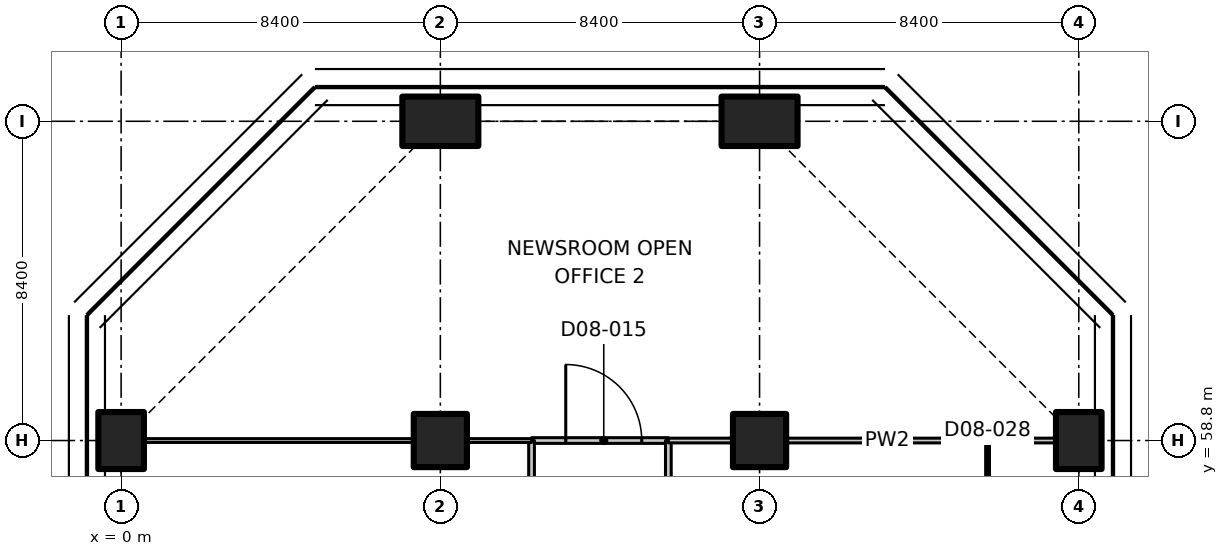
"""IFC4 building model, lengths in metres.
Left out: names, types, materials, properties, quantities, classifications, styles, units other than length and angle.
Written with IfcOpenShell. Run it as: python <this file> out.ifc"""

import sys

from ifc_helpers import new_model, si_unit, direction, frame, frame_2d, origin, origin_2d, place, context, subcontext, project, spatial, rectangle, extrude, element, fill, save


model = new_model("IFC4")
c1 = context("Model", 3, precision=1e-05, world=origin(), true_north=direction((0.0, 1.0)))
c2 = subcontext(c1, "Body", "Model", "MODEL_VIEW")
j1 = project(units=[si_unit("LENGTHUNIT", "METRE"), si_unit("PLANEANGLEUNIT", "RADIAN")], contexts=[c1])
p1 = place(None, origin())
s1 = spatial("IfcSite", under=j1, at=p1, CompositionType="ELEMENT")
p2 = place(p1, origin())
s2 = spatial("IfcBuilding", under=s1, at=p2, CompositionType="ELEMENT")
p3 = place(p2, frame((0.0, 0.0, 47.3)))
s3 = spatial("IfcBuildingStorey", under=s2, at=p3, CompositionType="ELEMENT", Elevation=47.3)
p4 = place(p3, frame((0.0, 58.8, 0.0), z_axis=(0.0, 0.0, 1.0), x_axis=(1.0, 0.0, 0.0)))
e1 = element("IfcColumn", 1, at=p4, inside=s3, PredefinedType="COLUMN", context=c2, shape_type="SweptSolid", body=[
    extrude(rectangle(XDim=1.2, YDim=1.5, at=origin_2d()), origin(), (0.0, 0.0, 1.0), 3.35),
])
p5 = place(p3, frame((8.4, 58.8, 0.0), z_axis=(0.0, 0.0, 1.0), x_axis=(1.0, 0.0, 0.0)))
e2 = element("IfcColumn", 2, at=p5, inside=s3, PredefinedType="COLUMN", context=c2, shape_type="SweptSolid", body=[
    extrude(rectangle(XDim=1.4, YDim=1.4, at=origin_2d()), origin(), (0.0, 0.0, 1.0), 3.35),
])
p6 = place(p3, frame((8.4, 67.2, 0.0), z_axis=(0.0, 0.0, 1.0), x_axis=(0.0, 1.0, 0.0)))
e3 = element("IfcColumn", 3, at=p6, inside=s3, PredefinedType="COLUMN", context=c2, shape_type="SweptSolid", body=[
    extrude(rectangle(XDim=1.3, YDim=2.0, at=origin_2d()), origin(), (0.0, 0.0, 1.0), 3.35),
])
p7 = place(p3, frame((16.8, 58.8, 0.0), z_axis=(0.0, 0.0, 1.0), x_axis=(1.0, 0.0, 0.0)))
e4 = element("IfcColumn", 4, at=p7, inside=s3, PredefinedType="COLUMN", context=c2, shape_type="SweptSolid", body=[
    extrude(rectangle(XDim=1.4, YDim=1.4, at=origin_2d()), origin(), (0.0, 0.0, 1.0), 3.35),
])
p8 = place(p3, frame((16.8, 67.2, 0.0), z_axis=(0.0, 0.0, 1.0), x_axis=(0.0, 1.0, 0.0)))
e5 = element("IfcColumn", 5, at=p8, inside=s3, PredefinedType="COLUMN", context=c2, shape_type="SweptSolid", body=[
    extrude(rectangle(XDim=1.3, YDim=2.0, at=origin_2d()), origin(), (0.0, 0.0, 1.0), 3.35),
])
p9 = place(p3, frame((25.2, 58.8, 0.0), z_axis=(0.0, 0.0, 1.0), x_axis=(1.0, 0.0, 0.0)))
e6 = element("IfcColumn", 6, at=p9, inside=s3, PredefinedType="COLUMN", context=c2, shape_type="SweptSolid", body=[
    extrude(rectangle(XDim=1.2, YDim=1.5, at=origin_2d()), origin(), (0.0, 0.0, 1.0), 3.35),
])
p10 = place(p3, frame((10.8, 58.8, 0.0), z_axis=(0.0, 0.0, 1.0), x_axis=(1.0, 0.0, 0.0)))
e7 = element("IfcWall", 7, at=p10, inside=s3, PredefinedType="PARTITIONING", context=c2, shape_type="SweptSolid", body=[
    extrude(rectangle(XDim=3.6, YDim=0.15, at=frame_2d((1.8, 0.0))), origin(), (0.0, 0.0, 1.0), 3.33),
])
p11 = place(p10, frame((0.9, 0.0, 0.0)))
e8 = element("IfcOpeningElement", 8, at=p11, cuts=e7, PredefinedType="OPENING", context=c2, shape_type="SweptSolid", body=[
    extrude(rectangle(XDim=2.0, YDim=2.4, at=frame_2d((1.0, 1.2))), frame((0.0, 0.085, 0.0), z_axis=(0.0, -1.0, 0.0), x_axis=(1.0, 0.0, 0.0)), (0.0, 0.0, 1.0), 0.17),
])
p12 = place(p3, frame((10.8, 50.4, 0.0), z_axis=(0.0, 0.0, 1.0), x_axis=(0.0, 1.0, 0.0)))
e9 = element("IfcWall", 9, at=p12, inside=s3, PredefinedType="PARTITIONING", context=c2, shape_type="SweptSolid", body=[
    extrude(rectangle(XDim=8.4, YDim=0.15, at=frame_2d((4.2, 0.0))), origin(), (0.0, 0.0, 1.0), 3.33),
])
p13 = place(p12, frame((3.3, 0.0, 0.0)))
e10 = element("IfcOpeningElement", 10, at=p13, cuts=e9, PredefinedType="OPENING", context=c2, shape_type="SweptSolid", body=[
    extrude(rectangle(XDim=1.6, YDim=2.1, at=frame_2d((0.8, 1.05))), frame((0.0, 0.085, 0.0), z_axis=(0.0, -1.0, 0.0), x_axis=(1.0, 0.0, 0.0)), (0.0, 0.0, 1.0), 0.17),
])
p14 = place(p3, frame((14.4, 58.8, 0.0), z_axis=(0.0, 0.0, 1.0), x_axis=(0.0, -1.0, 0.0)))
e11 = element("IfcWall", 11, at=p14, inside=s3, PredefinedType="PARTITIONING", context=c2, shape_type="SweptSolid", body=[
    extrude(rectangle(XDim=4.2, YDim=0.15, at=frame_2d((2.1, 0.0))), origin(), (0.0, 0.0, 1.0), 3.33),
])
p15 = place(p3, frame((10.8, 58.8, 0.0), z_axis=(0.0, 0.0, 1.0), x_axis=(-1.0, 0.0, 0.0)))
e12 = element("IfcWall", 12, at=p15, inside=s3, PredefinedType="PARTITIONING", context=c2, shape_type="SweptSolid", body=[
    extrude(rectangle(XDim=1.68, YDim=0.1, at=frame_2d((0.84, 0.0))), origin(), (0.0, 0.0, 1.0), 3.33),
])
p16 = place(p3, frame((7.68, 58.8, 0.0), z_axis=(0.0, 0.0, 1.0), x_axis=(-1.0, 0.0, 0.0)))
e13 = element("IfcWall", 13, at=p16, inside=s3, PredefinedType="PARTITIONING", context=c2, shape_type="SweptSolid", body=[
    extrude(rectangle(XDim=7.06, YDim=0.1, at=frame_2d((3.53, 0.0))), origin(), (0.0, 0.0, 1.0), 3.33),
])
p17 = place(p3, frame((22.8, 58.8, 0.0), z_axis=(0.0, 0.0, 1.0), x_axis=(-1.0, 0.0, 0.0)))
e14 = element("IfcWall", 14, at=p17, inside=s3, PredefinedType="PARTITIONING", context=c2, shape_type="SweptSolid", body=[
    extrude(rectangle(XDim=5.28, YDim=0.125, at=frame_2d((2.64, 0.0))), origin(), (0.0, 0.0, 1.0), 3.33),
])
p18 = place(p3, frame((16.08, 58.8, 0.0), z_axis=(0.0, 0.0, 1.0), x_axis=(-1.0, 0.0, 0.0)))
e15 = element("IfcWall", 15, at=p18, inside=s3, PredefinedType="PARTITIONING", context=c2, shape_type="SweptSolid", body=[
    extrude(rectangle(XDim=1.68, YDim=0.125, at=frame_2d((0.84, 0.0))), origin(), (0.0, 0.0, 1.0), 3.33),
])
p19 = place(p3, frame((24.58, 58.8, 0.0), z_axis=(0.0, 0.0, 1.0), x_axis=(-1.0, 0.0, 0.0)))
e16 = element("IfcWall", 16, at=p19, inside=s3, PredefinedType="PARTITIONING", context=c2, shape_type="SweptSolid", body=[
    extrude(rectangle(XDim=1.78, YDim=0.125, at=frame_2d((0.89, 0.0))), origin(), (0.0, 0.0, 1.0), 3.33),
])
p20 = place(p3, frame((22.8, 58.8, 0.0), z_axis=(0.0, 0.0, 1.0), x_axis=(0.0, -1.0, 0.0)))
e17 = element("IfcWall", 17, at=p20, inside=s3, PredefinedType="PARTITIONING", context=c2, shape_type="SweptSolid", body=[
    extrude(rectangle(XDim=4.2, YDim=0.1, at=frame_2d((2.1, 0.0))), origin(), (0.0, 0.0, 1.0), 3.33),
])
p21 = place(p20, frame((1.5, 0.0, 0.0)))
e18 = element("IfcOpeningElement", 18, at=p21, cuts=e17, PredefinedType="OPENING", context=c2, shape_type="SweptSolid", body=[
    extrude(rectangle(XDim=0.9, YDim=2.1, at=frame_2d((0.45, 1.05))), frame((0.0, 0.06, 0.0), z_axis=(0.0, -1.0, 0.0), x_axis=(1.0, 0.0, 0.0)), (0.0, 0.0, 1.0), 0.12),
])
p22 = place(p11, origin())
e19 = element("IfcDoor", 19, at=p22, inside=s3, OperationType="DOUBLE_DOOR_SINGLE_SWING", PredefinedType="DOOR", context=c2, shape_type="SweptSolid", body=[
    extrude(rectangle(XDim=2.0, YDim=2.4, at=frame_2d((1.0, 1.2))), frame((0.0, 0.025, 0.0), z_axis=(0.0, -1.0, 0.0), x_axis=(1.0, 0.0, 0.0)), (0.0, 0.0, 1.0), 0.05),
])
fill(e8, e19)
save(model, sys.argv[1])
